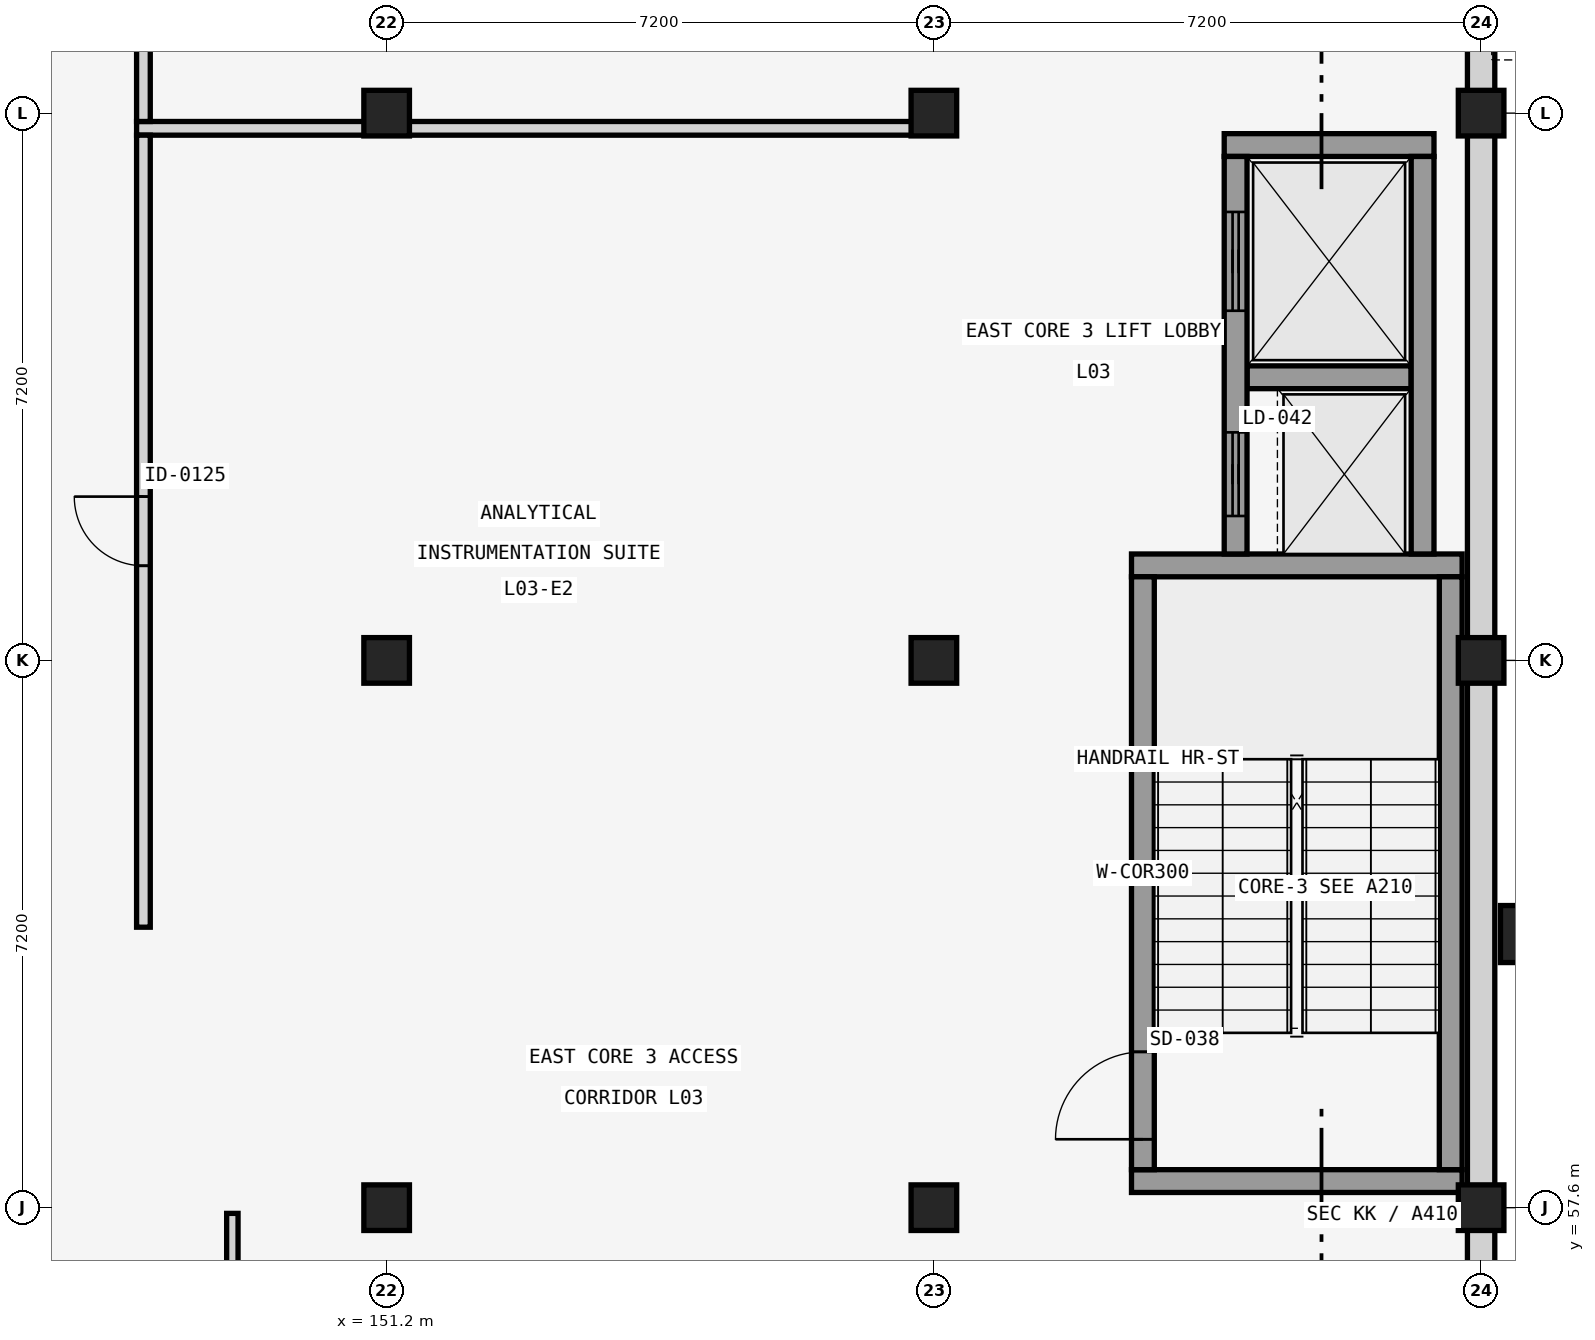
"""IFC4 building model, lengths in metres.
Left out: names, types, materials, properties, quantities, classifications, styles, units other than length and angle.
Written with IfcOpenShell. Run it as: python <this file> out.ifc"""

import sys

from ifc_helpers import new_model, si_unit, direction, frame, frame_2d, origin, origin_2d, place, context, subcontext, project, spatial, rectangle, extrude, element, fill, save


model = new_model("IFC4")
c1 = context("Model", 3, precision=1e-05, world=origin(), true_north=direction((0.0, 1.0)))
c2 = subcontext(c1, "Body", "Model", "MODEL_VIEW")
j1 = project(units=[si_unit("LENGTHUNIT", "METRE"), si_unit("PLANEANGLEUNIT", "RADIAN")], contexts=[c1])
p1 = place(None, origin())
s1 = spatial("IfcSite", under=j1, at=p1, CompositionType="ELEMENT")
p2 = place(p1, origin())
s2 = spatial("IfcBuilding", under=s1, at=p2, CompositionType="ELEMENT")
p3 = place(p2, frame((0.0, 0.0, 13.12)))
s3 = spatial("IfcBuildingStorey", under=s2, at=p3, CompositionType="ELEMENT", Elevation=13.12)
for number, where, z_axis, x_axis in (
    (1, (151.2, 57.6, 0.0), (0.0, 0.0, 1.0), (1.0, 0.0, 0.0)),
    (2, (151.2, 64.8, 0.0), (0.0, 0.0, 1.0), (1.0, 0.0, 0.0)),
    (3, (151.2, 72.0, 0.0), (0.0, 0.0, 1.0), (1.0, 0.0, 0.0)),
    (4, (158.4, 57.6, 0.0), (0.0, 0.0, 1.0), (1.0, 0.0, 0.0)),
    (5, (158.4, 64.8, 0.0), (0.0, 0.0, 1.0), (1.0, 0.0, 0.0)),
    (6, (158.4, 72.0, 0.0), (0.0, 0.0, 1.0), (1.0, 0.0, 0.0)),
    (7, (165.6, 57.6, 0.0), (0.0, 0.0, 1.0), (1.0, 0.0, 0.0)),
    (8, (165.6, 64.8, 0.0), (0.0, 0.0, 1.0), (1.0, 0.0, 0.0)),
    (9, (165.6, 72.0, 0.0), (0.0, 0.0, 1.0), (1.0, 0.0, 0.0)),
):
    element("IfcColumn", number, at=place(p3, frame(where, z_axis=z_axis, x_axis=x_axis)), inside=s3, PredefinedType="COLUMN", context=c2, shape_type="SweptSolid", body=[
        extrude(rectangle(XDim=0.6, YDim=0.6, at=origin_2d()), origin(), (0.0, 0.0, 1.0), 4.16),
    ])
p4 = place(p3, frame((166.08, 61.2, 0.0), z_axis=(0.0, 0.0, 1.0), x_axis=(1.0, 0.0, 0.0)))
e10 = element("IfcColumn", 10, at=p4, inside=s3, PredefinedType="PILASTER", context=c2, shape_type="SweptSolid", body=[
    extrude(rectangle(XDim=0.45, YDim=0.75, at=origin_2d()), origin(), (0.0, 0.0, 1.0), 4.16),
])
p5 = place(p3, frame((165.6, 50.69, 0.0), z_axis=(0.0, 0.0, 1.0), x_axis=(0.0, 1.0, 0.0)))
e11 = element("IfcWall", 11, at=p5, inside=s3, PredefinedType="SOLIDWALL", context=c2, shape_type="SweptSolid", body=[
    extrude(rectangle(XDim=6.62, YDim=0.36, at=frame_2d((3.31, 0.0))), origin(), (0.0, 0.0, 1.0), 3.16),
])
p6 = place(p5, frame((2.335, 0.0, 0.95)))
e12 = element("IfcOpeningElement", 12, at=p6, cuts=e11, PredefinedType="OPENING", context=c2, shape_type="SweptSolid", body=[
    extrude(rectangle(XDim=1.95, YDim=1.95, at=frame_2d((0.975, 0.975))), frame((0.0, 0.19, 0.0), z_axis=(0.0, -1.0, 0.0), x_axis=(1.0, 0.0, 0.0)), (0.0, 0.0, 1.0), 0.38),
])
p7 = place(p3, frame((165.6, 57.89, 0.0), z_axis=(0.0, 0.0, 1.0), x_axis=(0.0, 1.0, 0.0)))
e13 = element("IfcWall", 13, at=p7, inside=s3, PredefinedType="SOLIDWALL", context=c2, shape_type="SweptSolid", body=[
    extrude(rectangle(XDim=6.62, YDim=0.36, at=frame_2d((3.31, 0.0))), origin(), (0.0, 0.0, 1.0), 3.16),
])
p8 = place(p3, frame((165.6, 65.09, 0.0), z_axis=(0.0, 0.0, 1.0), x_axis=(0.0, 1.0, 0.0)))
e14 = element("IfcWall", 14, at=p8, inside=s3, PredefinedType="SOLIDWALL", context=c2, shape_type="SweptSolid", body=[
    extrude(rectangle(XDim=6.62, YDim=0.36, at=frame_2d((3.31, 0.0))), origin(), (0.0, 0.0, 1.0), 3.16),
])
p9 = place(p3, frame((165.6, 72.29, 0.0), z_axis=(0.0, 0.0, 1.0), x_axis=(0.0, 1.0, 0.0)))
e15 = element("IfcWall", 15, at=p9, inside=s3, PredefinedType="SOLIDWALL", context=c2, shape_type="SweptSolid", body=[
    extrude(rectangle(XDim=6.62, YDim=0.36, at=frame_2d((3.31, 0.0))), origin(), (0.0, 0.0, 1.0), 3.16),
])
p10 = place(p9, frame((1.885, 0.0, 0.95)))
e16 = element("IfcOpeningElement", 16, at=p10, cuts=e15, PredefinedType="OPENING", context=c2, shape_type="SweptSolid", body=[
    extrude(rectangle(XDim=2.85, YDim=1.95, at=frame_2d((1.425, 0.975))), frame((0.0, 0.19, 0.0), z_axis=(0.0, -1.0, 0.0), x_axis=(1.0, 0.0, 0.0)), (0.0, 0.0, 1.0), 0.38),
])
for number, where, z_axis, x_axis in (
    (17, (161.0, 57.95, 0.0), (0.0, 0.0, 1.0), (1.0, 0.0, 0.0)),
    (18, (161.0, 66.05, 0.0), (0.0, 0.0, 1.0), (1.0, 0.0, 0.0)),
):
    element("IfcWall", number, at=place(p3, frame(where, z_axis=z_axis, x_axis=x_axis)), inside=s3, PredefinedType="SHEAR", context=c2, shape_type="SweptSolid", body=[
        extrude(rectangle(XDim=4.35, YDim=0.3, at=frame_2d((2.175, 0.0))), origin(), (0.0, 0.0, 1.0), 3.81),
    ])
p11 = place(p3, frame((161.15, 58.1, 0.0), z_axis=(0.0, 0.0, 1.0), x_axis=(0.0, 1.0, 0.0)))
e19 = element("IfcWall", 19, at=p11, inside=s3, PredefinedType="SHEAR", context=c2, shape_type="SweptSolid", body=[
    extrude(rectangle(XDim=7.8, YDim=0.3, at=frame_2d((3.9, 0.0))), origin(), (0.0, 0.0, 1.0), 3.81),
])
p12 = place(p11, frame((0.4, 0.0, 0.0)))
e20 = element("IfcOpeningElement", 20, at=p12, cuts=e19, PredefinedType="OPENING", context=c2, shape_type="SweptSolid", body=[
    extrude(rectangle(XDim=1.15, YDim=2.2, at=frame_2d((0.575, 1.1))), frame((0.0, 0.16, 0.0), z_axis=(0.0, -1.0, 0.0), x_axis=(1.0, 0.0, 0.0)), (0.0, 0.0, 1.0), 0.32),
])
p13 = place(p3, frame((165.2, 58.1, 0.0), z_axis=(0.0, 0.0, 1.0), x_axis=(0.0, 1.0, 0.0)))
e21 = element("IfcWall", 21, at=p13, inside=s3, PredefinedType="SHEAR", context=c2, shape_type="SweptSolid", body=[
    extrude(rectangle(XDim=7.8, YDim=0.3, at=frame_2d((3.9, 0.0))), origin(), (0.0, 0.0, 1.0), 3.81),
])
p14 = place(p3, frame((162.22, 71.58, 0.0), z_axis=(0.0, 0.0, 1.0), x_axis=(1.0, 0.0, 0.0)))
e22 = element("IfcWall", 22, at=p14, inside=s3, PredefinedType="SHEAR", context=c2, shape_type="SweptSolid", body=[
    extrude(rectangle(XDim=2.76, YDim=0.3, at=frame_2d((1.38, 0.0))), origin(), (0.0, 0.0, 1.0), 3.81),
])
p15 = place(p3, frame((162.52, 68.525, 0.0), z_axis=(0.0, 0.0, 1.0), x_axis=(1.0, 0.0, 0.0)))
e23 = element("IfcWall", 23, at=p15, inside=s3, PredefinedType="SHEAR", context=c2, shape_type="SweptSolid", body=[
    extrude(rectangle(XDim=2.16, YDim=0.3, at=frame_2d((1.08, 0.0))), origin(), (0.0, 0.0, 1.0), 3.81),
])
p16 = place(p3, frame((162.37, 66.2, 0.0), z_axis=(0.0, 0.0, 1.0), x_axis=(0.0, 1.0, 0.0)))
e24 = element("IfcWall", 24, at=p16, inside=s3, PredefinedType="SHEAR", context=c2, shape_type="SweptSolid", body=[
    extrude(rectangle(XDim=5.23, YDim=0.3, at=frame_2d((2.615, 0.0))), origin(), (0.0, 0.0, 1.0), 3.81),
])
p17 = place(p16, frame((0.5, 0.0, 0.0)))
e25 = element("IfcOpeningElement", 25, at=p17, cuts=e24, PredefinedType="OPENING", context=c2, shape_type="SweptSolid", body=[
    extrude(rectangle(XDim=1.1, YDim=2.2, at=frame_2d((0.55, 1.1))), frame((0.0, 0.16, 0.0), z_axis=(0.0, -1.0, 0.0), x_axis=(1.0, 0.0, 0.0)), (0.0, 0.0, 1.0), 0.32),
])
p18 = place(p16, frame((3.2, 0.0, 0.0)))
e26 = element("IfcOpeningElement", 26, at=p18, cuts=e24, PredefinedType="OPENING", context=c2, shape_type="SweptSolid", body=[
    extrude(rectangle(XDim=1.3, YDim=2.2, at=frame_2d((0.65, 1.1))), frame((0.0, 0.16, 0.0), z_axis=(0.0, -1.0, 0.0), x_axis=(1.0, 0.0, 0.0)), (0.0, 0.0, 1.0), 0.32),
])
p19 = place(p3, frame((164.83, 66.2, 0.0), z_axis=(0.0, 0.0, 1.0), x_axis=(0.0, 1.0, 0.0)))
e27 = element("IfcWall", 27, at=p19, inside=s3, PredefinedType="SHEAR", context=c2, shape_type="SweptSolid", body=[
    extrude(rectangle(XDim=5.23, YDim=0.3, at=frame_2d((2.615, 0.0))), origin(), (0.0, 0.0, 1.0), 3.81),
])
p20 = place(p3, frame((149.17, 36.16, 0.0), z_axis=(0.0, 0.0, 1.0), x_axis=(0.0, 1.0, 0.0)))
e28 = element("IfcWall", 28, at=p20, inside=s3, PredefinedType="PARTITIONING", context=c2, shape_type="SweptSolid", body=[
    extrude(rectangle(XDim=21.365, YDim=0.15, at=frame_2d((10.683, 0.0))), origin(), (0.0, 0.0, 1.0), 3.16),
])
p21 = place(p20, frame((9.808, 0.0, 0.0)))
e29 = element("IfcOpeningElement", 29, at=p21, cuts=e28, PredefinedType="OPENING", context=c2, shape_type="SweptSolid", body=[
    extrude(rectangle(XDim=1.75, YDim=2.25, at=frame_2d((0.875, 1.125))), frame((0.0, 0.085, 0.0), z_axis=(0.0, -1.0, 0.0), x_axis=(1.0, 0.0, 0.0)), (0.0, 0.0, 1.0), 0.17),
])
p22 = place(p3, frame((147.91, 71.8, 0.0), z_axis=(0.0, 0.0, 1.0), x_axis=(1.0, 0.0, 0.0)))
e30 = element("IfcWall", 30, at=p22, inside=s3, PredefinedType="PARTITIONING", context=c2, shape_type="SweptSolid", body=[
    extrude(rectangle(XDim=10.58, YDim=0.18, at=frame_2d((5.29, 0.0))), origin(), (0.0, 0.0, 1.0), 3.16),
])
p23 = place(p3, frame((148.0, 61.29, 0.0), z_axis=(0.0, 0.0, 1.0), x_axis=(0.0, 1.0, 0.0)))
e31 = element("IfcWall", 31, at=p23, inside=s3, PredefinedType="PARTITIONING", context=c2, shape_type="SweptSolid", body=[
    extrude(rectangle(XDim=10.42, YDim=0.18, at=frame_2d((5.21, 0.0))), origin(), (0.0, 0.0, 1.0), 3.16),
])
p24 = place(p23, frame((4.755, 0.0, 0.0)))
e32 = element("IfcOpeningElement", 32, at=p24, cuts=e31, PredefinedType="OPENING", context=c2, shape_type="SweptSolid", body=[
    extrude(rectangle(XDim=0.91, YDim=2.08, at=frame_2d((0.455, 1.04))), frame((0.0, 0.1, 0.0), z_axis=(0.0, -1.0, 0.0), x_axis=(1.0, 0.0, 0.0)), (0.0, 0.0, 1.0), 0.2),
])
p25 = place(p3, frame((148.0, 71.89, 0.0), z_axis=(0.0, 0.0, 1.0), x_axis=(0.0, 1.0, 0.0)))
e33 = element("IfcWall", 33, at=p25, inside=s3, PredefinedType="PARTITIONING", context=c2, shape_type="SweptSolid", body=[
    extrude(rectangle(XDim=14.42, YDim=0.18, at=frame_2d((7.21, 0.0))), origin(), (0.0, 0.0, 1.0), 3.16),
])
p26 = place(p25, frame((6.725, 0.0, 0.0)))
e34 = element("IfcOpeningElement", 34, at=p26, cuts=e33, PredefinedType="OPENING", context=c2, shape_type="SweptSolid", body=[
    extrude(rectangle(XDim=0.97, YDim=2.08, at=frame_2d((0.485, 1.04))), frame((0.0, 0.1, 0.0), z_axis=(0.0, -1.0, 0.0), x_axis=(1.0, 0.0, 0.0)), (0.0, 0.0, 1.0), 0.2),
])
p27 = place(p12, frame((1.15, 0.0, 0.0), z_axis=(0.0, 0.0, 1.0), x_axis=(-1.0, 0.0, 0.0)))
e35 = element("IfcDoor", 35, at=p27, inside=s3, OperationType="SINGLE_SWING_LEFT", PredefinedType="DOOR", context=c2, shape_type="SweptSolid", body=[
    extrude(rectangle(XDim=1.15, YDim=2.2, at=frame_2d((0.575, 1.1))), frame((0.0, 0.025, 0.0), z_axis=(0.0, -1.0, 0.0), x_axis=(1.0, 0.0, 0.0)), (0.0, 0.0, 1.0), 0.05),
])
fill(e20, e35)
p28 = place(p17, origin())
e36 = element("IfcDoor", 36, at=p28, inside=s3, OperationType="SLIDING_TO_LEFT", PredefinedType="DOOR", context=c2, shape_type="SweptSolid", body=[
    extrude(rectangle(XDim=1.1, YDim=2.2, at=frame_2d((0.55, 1.1))), frame((0.0, 0.025, 0.0), z_axis=(0.0, -1.0, 0.0), x_axis=(1.0, 0.0, 0.0)), (0.0, 0.0, 1.0), 0.05),
])
fill(e25, e36)
p29 = place(p18, origin())
e37 = element("IfcDoor", 37, at=p29, inside=s3, OperationType="SLIDING_TO_LEFT", PredefinedType="DOOR", context=c2, shape_type="SweptSolid", body=[
    extrude(rectangle(XDim=1.3, YDim=2.2, at=frame_2d((0.65, 1.1))), frame((0.0, 0.025, 0.0), z_axis=(0.0, -1.0, 0.0), x_axis=(1.0, 0.0, 0.0)), (0.0, 0.0, 1.0), 0.05),
])
fill(e26, e37)
p30 = place(p24, origin())
e38 = element("IfcDoor", 38, at=p30, inside=s3, OperationType="SINGLE_SWING_RIGHT", PredefinedType="DOOR", context=c2, shape_type="SweptSolid", body=[
    extrude(rectangle(XDim=0.91, YDim=2.08, at=frame_2d((0.455, 1.04))), frame((0.0, 0.025, 0.0), z_axis=(0.0, -1.0, 0.0), x_axis=(1.0, 0.0, 0.0)), (0.0, 0.0, 1.0), 0.05),
])
fill(e32, e38)
save(model, sys.argv[1])
